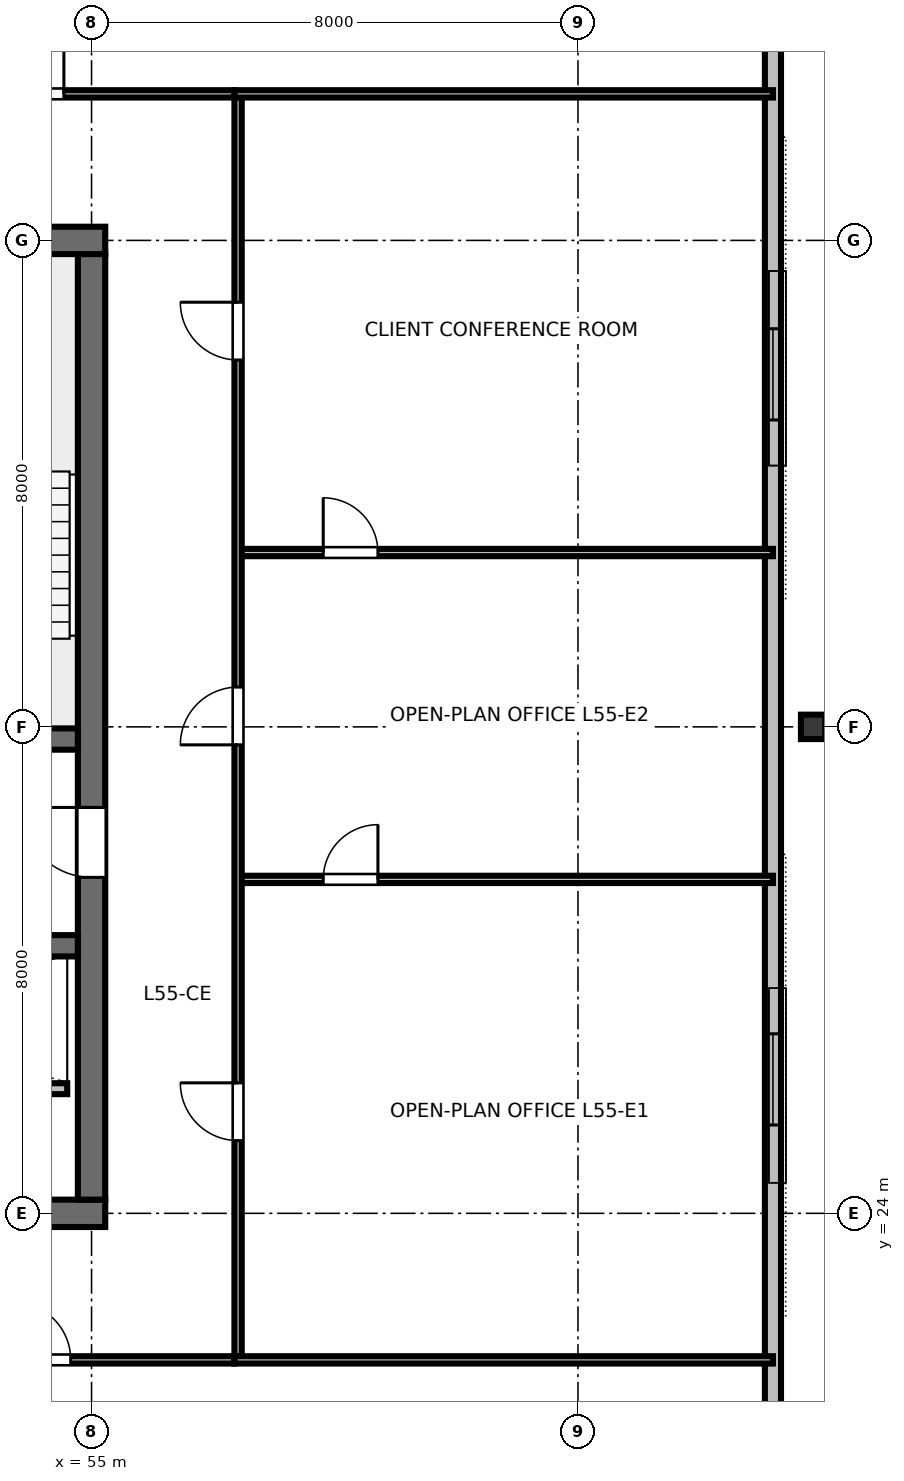
"""IFC4 building model, lengths in metres.
Left out: names, types, materials, properties, quantities, classifications, styles, units other than length and angle.
Written with IfcOpenShell. Run it as: python <this file> out.ifc"""

import sys

from ifc_helpers import new_model, si_unit, direction, frame, frame_2d, origin, origin_2d, place, context, subcontext, project, spatial, rectangle, i_section, extrude, element, fill, save


model = new_model("IFC4")
c1 = context("Model", 3, precision=1e-05, world=origin(), true_north=direction((0.0, 1.0)))
c2 = subcontext(c1, "Body", "Model", "MODEL_VIEW")
j1 = project(units=[si_unit("LENGTHUNIT", "METRE"), si_unit("PLANEANGLEUNIT", "RADIAN")], contexts=[c1])
p1 = place(None, origin())
s1 = spatial("IfcSite", under=j1, at=p1, CompositionType="ELEMENT")
p2 = place(p1, origin())
s2 = spatial("IfcBuilding", under=s1, at=p2, CompositionType="ELEMENT")
p3 = place(p2, frame((0.0, 0.0, 209.4)))
s3 = spatial("IfcBuildingStorey", under=s2, at=p3, CompositionType="ELEMENT", Elevation=209.4)
p4 = place(p3, frame((36.775, 24.0, 0.0), z_axis=(0.0, 0.0, 1.0), x_axis=(1.0, 0.0, 0.0)))
e1 = element("IfcWall", 1, at=p4, inside=s3, PredefinedType="SHEAR", context=c2, shape_type="SweptSolid", body=[
    extrude(rectangle(XDim=18.45, YDim=0.45, at=frame_2d((9.225, 0.0))), origin(), (0.0, 0.0, 1.0), 3.36),
])
p5 = place(p4, frame((13.425, 0.0, 0.0)))
e2 = element("IfcOpeningElement", 2, at=p5, cuts=e1, PredefinedType="OPENING", context=c2, shape_type="SweptSolid", body=[
    extrude(rectangle(XDim=1.6, YDim=2.15, at=frame_2d((0.8, 1.075))), frame((0.0, 0.235, 0.0), z_axis=(0.0, -1.0, 0.0), x_axis=(1.0, 0.0, 0.0)), (0.0, 0.0, 1.0), 0.47),
])
p6 = place(p3, frame((36.775, 40.0, 0.0), z_axis=(0.0, 0.0, 1.0), x_axis=(1.0, 0.0, 0.0)))
e3 = element("IfcWall", 3, at=p6, inside=s3, PredefinedType="SHEAR", context=c2, shape_type="SweptSolid", body=[
    extrude(rectangle(XDim=18.45, YDim=0.45, at=frame_2d((9.225, 0.0))), origin(), (0.0, 0.0, 1.0), 3.36),
])
p7 = place(p6, frame((8.725, 0.0, 0.0)))
e4 = element("IfcOpeningElement", 4, at=p7, cuts=e3, PredefinedType="OPENING", context=c2, shape_type="SweptSolid", body=[
    extrude(rectangle(XDim=1.0, YDim=2.15, at=frame_2d((0.5, 1.075))), frame((0.0, 0.235, 0.0), z_axis=(0.0, -1.0, 0.0), x_axis=(1.0, 0.0, 0.0)), (0.0, 0.0, 1.0), 0.47),
])
p8 = place(p3, frame((55.0, 24.225, 0.0), z_axis=(0.0, 0.0, 1.0), x_axis=(0.0, 1.0, 0.0)))
e5 = element("IfcWall", 5, at=p8, inside=s3, PredefinedType="SHEAR", context=c2, shape_type="SweptSolid", body=[
    extrude(rectangle(XDim=15.55, YDim=0.45, at=frame_2d((7.775, 0.0))), origin(), (0.0, 0.0, 1.0), 3.36),
])
p9 = place(p8, frame((5.3, 0.0, 0.0)))
e6 = element("IfcOpeningElement", 6, at=p9, cuts=e5, PredefinedType="OPENING", context=c2, shape_type="SweptSolid", body=[
    extrude(rectangle(XDim=1.15, YDim=2.15, at=frame_2d((0.575, 1.075))), frame((0.0, 0.235, 0.0), z_axis=(0.0, -1.0, 0.0), x_axis=(1.0, 0.0, 0.0)), (0.0, 0.0, 1.0), 0.47),
])
p10 = place(p3, frame((37.225, 31.8, 0.0), z_axis=(0.0, 0.0, 1.0), x_axis=(1.0, 0.0, 0.0)))
e7 = element("IfcWall", 7, at=p10, inside=s3, PredefinedType="SHEAR", context=c2, shape_type="SweptSolid", body=[
    extrude(rectangle(XDim=17.55, YDim=0.35, at=frame_2d((8.775, 0.0))), origin(), (0.0, 0.0, 1.0), 3.36),
])
p11 = place(p10, frame((0.825, 0.0, 0.0)))
e8 = element("IfcOpeningElement", 8, at=p11, cuts=e7, PredefinedType="OPENING", context=c2, shape_type="SweptSolid", body=[
    extrude(rectangle(XDim=1.1, YDim=2.15, at=frame_2d((0.55, 1.075))), frame((0.0, 0.185, 0.0), z_axis=(0.0, -1.0, 0.0), x_axis=(1.0, 0.0, 0.0)), (0.0, 0.0, 1.0), 0.37),
])
p12 = place(p10, frame((14.725, 0.0, 0.0)))
e9 = element("IfcOpeningElement", 9, at=p12, cuts=e7, PredefinedType="OPENING", context=c2, shape_type="SweptSolid", body=[
    extrude(rectangle(XDim=1.1, YDim=2.15, at=frame_2d((0.55, 1.075))), frame((0.0, 0.185, 0.0), z_axis=(0.0, -1.0, 0.0), x_axis=(1.0, 0.0, 0.0)), (0.0, 0.0, 1.0), 0.37),
])
p13 = place(p3, frame((37.225, 28.4, 0.0), z_axis=(0.0, 0.0, 1.0), x_axis=(1.0, 0.0, 0.0)))
e10 = element("IfcWall", 10, at=p13, inside=s3, PredefinedType="SHEAR", context=c2, shape_type="SweptSolid", body=[
    extrude(rectangle(XDim=17.55, YDim=0.35, at=frame_2d((8.775, 0.0))), origin(), (0.0, 0.0, 1.0), 3.36),
])
p14 = place(p3, frame((66.866, 32.0, 0.0), z_axis=(0.0, 0.0, 1.0), x_axis=(0.0, 1.0, 0.0)))
e11 = element("IfcColumn", 11, at=p14, inside=s3, PredefinedType="COLUMN", context=c2, shape_type="SweptSolid", body=[
    extrude(i_section(OverallWidth=0.401, OverallDepth=0.399, WebThickness=0.025, FlangeThickness=0.04, FilletRadius=0.025, at=origin_2d()), origin(), (0.0, 0.0, 1.0), 3.373),
])
p15 = place(p3, frame((66.206, 19.305, 0.0), z_axis=(0.0, 0.0, 1.0), x_axis=(0.0, 1.0, 0.0)))
e12 = element("IfcWall", 12, at=p15, inside=s3, PredefinedType="STANDARD", context=c2, shape_type="SweptSolid", body=[
    extrude(rectangle(XDim=25.389, YDim=0.265, at=frame_2d((12.695, 0.0))), origin(), (0.0, 0.0, 1.0), 3.375),
])
p16 = place(p15, frame((6.147, 0.0, 0.85)))
e13 = element("IfcOpeningElement", 13, at=p16, cuts=e12, PredefinedType="OPENING", context=c2, shape_type="SweptSolid", body=[
    extrude(rectangle(XDim=1.5, YDim=1.85, at=frame_2d((0.75, 0.925))), frame((0.0, 0.142, 0.0), z_axis=(0.0, -1.0, 0.0), x_axis=(1.0, 0.0, 0.0)), (0.0, 0.0, 1.0), 0.285),
])
p17 = place(p15, frame((17.742, 0.0, 0.85)))
e14 = element("IfcOpeningElement", 14, at=p17, cuts=e12, PredefinedType="OPENING", context=c2, shape_type="SweptSolid", body=[
    extrude(rectangle(XDim=1.5, YDim=1.85, at=frame_2d((0.75, 0.925))), frame((0.0, 0.142, 0.0), z_axis=(0.0, -1.0, 0.0), x_axis=(1.0, 0.0, 0.0)), (0.0, 0.0, 1.0), 0.285),
])
p18 = place(p3, frame((47.6, 26.05, 0.0), z_axis=(0.0, 0.0, 1.0), x_axis=(1.0, 0.0, 0.0)))
e15 = element("IfcWall", 15, at=p18, inside=s3, PredefinedType="PARTITIONING", context=c2, shape_type="SweptSolid", body=[
    extrude(rectangle(XDim=7.0, YDim=0.18, at=frame_2d((3.5, 0.0))), origin(), (0.0, 0.0, 1.0), 3.375),
])
p19 = place(p18, frame((1.2, 0.0, 0.0)))
e16 = element("IfcOpeningElement", 16, at=p19, cuts=e15, PredefinedType="OPENING", context=c2, shape_type="SweptSolid", body=[
    extrude(rectangle(XDim=1.05, YDim=2.15, at=frame_2d((0.525, 1.075))), frame((0.0, 0.1, 0.0), z_axis=(0.0, -1.0, 0.0), x_axis=(1.0, 0.0, 0.0)), (0.0, 0.0, 1.0), 0.2),
])
p20 = place(p18, frame((3.4, 0.0, 0.0)))
e17 = element("IfcOpeningElement", 17, at=p20, cuts=e15, PredefinedType="OPENING", context=c2, shape_type="SweptSolid", body=[
    extrude(rectangle(XDim=1.05, YDim=2.15, at=frame_2d((0.525, 1.075))), frame((0.0, 0.1, 0.0), z_axis=(0.0, -1.0, 0.0), x_axis=(1.0, 0.0, 0.0)), (0.0, 0.0, 1.0), 0.2),
])
p21 = place(p3, frame((47.02, 21.59, 0.0), z_axis=(0.0, 0.0, 1.0), x_axis=(1.0, 0.0, 0.0)))
e18 = element("IfcWall", 18, at=p21, inside=s3, PredefinedType="PARTITIONING", context=c2, shape_type="SweptSolid", body=[
    extrude(rectangle(XDim=10.33, YDim=0.12, at=frame_2d((5.165, 0.0))), origin(), (0.0, 0.0, 1.0), 2.655),
])
p22 = place(p21, frame((1.593, 0.0, 0.0)))
e19 = element("IfcOpeningElement", 19, at=p22, cuts=e18, PredefinedType="OPENING", context=c2, shape_type="SweptSolid", body=[
    extrude(rectangle(XDim=0.95, YDim=2.15, at=frame_2d((0.475, 1.075))), frame((0.0, 0.07, 0.0), z_axis=(0.0, -1.0, 0.0), x_axis=(1.0, 0.0, 0.0)), (0.0, 0.0, 1.0), 0.14),
])
p23 = place(p21, frame((6.688, 0.0, 0.0)))
e20 = element("IfcOpeningElement", 20, at=p23, cuts=e18, PredefinedType="OPENING", context=c2, shape_type="SweptSolid", body=[
    extrude(rectangle(XDim=0.95, YDim=2.15, at=frame_2d((0.475, 1.075))), frame((0.0, 0.07, 0.0), z_axis=(0.0, -1.0, 0.0), x_axis=(1.0, 0.0, 0.0)), (0.0, 0.0, 1.0), 0.14),
])
p24 = place(p3, frame((47.02, 42.41, 0.0), z_axis=(0.0, 0.0, 1.0), x_axis=(1.0, 0.0, 0.0)))
e21 = element("IfcWall", 21, at=p24, inside=s3, PredefinedType="PARTITIONING", context=c2, shape_type="SweptSolid", body=[
    extrude(rectangle(XDim=10.33, YDim=0.12, at=frame_2d((5.165, 0.0))), origin(), (0.0, 0.0, 1.0), 2.655),
])
p25 = place(p24, frame((1.48, 0.0, 0.0)))
e22 = element("IfcOpeningElement", 22, at=p25, cuts=e21, PredefinedType="OPENING", context=c2, shape_type="SweptSolid", body=[
    extrude(rectangle(XDim=0.95, YDim=2.15, at=frame_2d((0.475, 1.075))), frame((0.0, 0.07, 0.0), z_axis=(0.0, -1.0, 0.0), x_axis=(1.0, 0.0, 0.0)), (0.0, 0.0, 1.0), 0.14),
])
p26 = place(p24, frame((6.575, 0.0, 0.0)))
e23 = element("IfcOpeningElement", 23, at=p26, cuts=e21, PredefinedType="OPENING", context=c2, shape_type="SweptSolid", body=[
    extrude(rectangle(XDim=0.95, YDim=2.15, at=frame_2d((0.475, 1.075))), frame((0.0, 0.07, 0.0), z_axis=(0.0, -1.0, 0.0), x_axis=(1.0, 0.0, 0.0)), (0.0, 0.0, 1.0), 0.14),
])
p27 = place(p3, frame((57.41, 29.492, 0.0), z_axis=(0.0, 0.0, 1.0), x_axis=(1.0, 0.0, 0.0)))
e24 = element("IfcWall", 24, at=p27, inside=s3, PredefinedType="PARTITIONING", context=c2, shape_type="SweptSolid", body=[
    extrude(rectangle(XDim=8.796, YDim=0.12, at=frame_2d((4.398, 0.0))), origin(), (0.0, 0.0, 1.0), 2.655),
])
p28 = place(p27, frame((1.4, 0.0, 0.0)))
e25 = element("IfcOpeningElement", 25, at=p28, cuts=e24, PredefinedType="OPENING", context=c2, shape_type="SweptSolid", body=[
    extrude(rectangle(XDim=0.9, YDim=2.15, at=frame_2d((0.45, 1.075))), frame((0.0, 0.07, 0.0), z_axis=(0.0, -1.0, 0.0), x_axis=(1.0, 0.0, 0.0)), (0.0, 0.0, 1.0), 0.14),
])
p29 = place(p3, frame((57.41, 34.867, 0.0), z_axis=(0.0, 0.0, 1.0), x_axis=(1.0, 0.0, 0.0)))
e26 = element("IfcWall", 26, at=p29, inside=s3, PredefinedType="PARTITIONING", context=c2, shape_type="SweptSolid", body=[
    extrude(rectangle(XDim=8.796, YDim=0.12, at=frame_2d((4.398, 0.0))), origin(), (0.0, 0.0, 1.0), 2.655),
])
p30 = place(p29, frame((1.4, 0.0, 0.0)))
e27 = element("IfcOpeningElement", 27, at=p30, cuts=e26, PredefinedType="OPENING", context=c2, shape_type="SweptSolid", body=[
    extrude(rectangle(XDim=0.9, YDim=2.15, at=frame_2d((0.45, 1.075))), frame((0.0, 0.07, 0.0), z_axis=(0.0, -1.0, 0.0), x_axis=(1.0, 0.0, 0.0)), (0.0, 0.0, 1.0), 0.14),
])
p31 = place(p3, frame((57.41, 21.65, 0.0), z_axis=(0.0, 0.0, 1.0), x_axis=(0.0, 1.0, 0.0)))
e28 = element("IfcWall", 28, at=p31, inside=s3, PredefinedType="PARTITIONING", context=c2, shape_type="SweptSolid", body=[
    extrude(rectangle(XDim=20.7, YDim=0.12, at=frame_2d((10.35, 0.0))), origin(), (0.0, 0.0, 1.0), 2.655),
])
p32 = place(p31, frame((3.546, 0.0, 0.0)))
e29 = element("IfcOpeningElement", 29, at=p32, cuts=e28, PredefinedType="OPENING", context=c2, shape_type="SweptSolid", body=[
    extrude(rectangle(XDim=0.95, YDim=2.15, at=frame_2d((0.475, 1.075))), frame((0.0, 0.07, 0.0), z_axis=(0.0, -1.0, 0.0), x_axis=(1.0, 0.0, 0.0)), (0.0, 0.0, 1.0), 0.14),
])
p33 = place(p31, frame((10.054, 0.0, 0.0)))
e30 = element("IfcOpeningElement", 30, at=p33, cuts=e28, PredefinedType="OPENING", context=c2, shape_type="SweptSolid", body=[
    extrude(rectangle(XDim=0.95, YDim=2.15, at=frame_2d((0.475, 1.075))), frame((0.0, 0.07, 0.0), z_axis=(0.0, -1.0, 0.0), x_axis=(1.0, 0.0, 0.0)), (0.0, 0.0, 1.0), 0.14),
])
p34 = place(p31, frame((16.384, 0.0, 0.0)))
e31 = element("IfcOpeningElement", 31, at=p34, cuts=e28, PredefinedType="OPENING", context=c2, shape_type="SweptSolid", body=[
    extrude(rectangle(XDim=0.95, YDim=2.15, at=frame_2d((0.475, 1.075))), frame((0.0, 0.07, 0.0), z_axis=(0.0, -1.0, 0.0), x_axis=(1.0, 0.0, 0.0)), (0.0, 0.0, 1.0), 0.14),
])
for number, where, z_axis, x_axis in (
    (32, (57.35, 21.59, 0.0), (0.0, 0.0, 1.0), (1.0, 0.0, 0.0)),
    (33, (57.35, 42.41, 0.0), (0.0, 0.0, 1.0), (1.0, 0.0, 0.0)),
):
    element("IfcWall", number, at=place(p3, frame(where, z_axis=z_axis, x_axis=x_axis)), inside=s3, PredefinedType="PARTITIONING", context=c2, shape_type="SweptSolid", body=[
        extrude(rectangle(XDim=8.856, YDim=0.12, at=frame_2d((4.428, 0.0))), origin(), (0.0, 0.0, 1.0), 2.655),
    ])
p35 = place(p16, origin())
e34 = element("IfcWindow", 34, at=p35, inside=s3, PartitioningType="SINGLE_PANEL", PredefinedType="WINDOW", context=c2, shape_type="SweptSolid", body=[
    extrude(rectangle(XDim=1.5, YDim=1.85, at=frame_2d((0.75, 0.925))), frame((0.0, 0.03, 0.0), z_axis=(0.0, -1.0, 0.0), x_axis=(1.0, 0.0, 0.0)), (0.0, 0.0, 1.0), 0.06),
])
fill(e13, e34)
p36 = place(p17, origin())
e35 = element("IfcWindow", 35, at=p36, inside=s3, PartitioningType="SINGLE_PANEL", PredefinedType="WINDOW", context=c2, shape_type="SweptSolid", body=[
    extrude(rectangle(XDim=1.5, YDim=1.85, at=frame_2d((0.75, 0.925))), frame((0.0, 0.03, 0.0), z_axis=(0.0, -1.0, 0.0), x_axis=(1.0, 0.0, 0.0)), (0.0, 0.0, 1.0), 0.06),
])
fill(e14, e35)
p37 = place(p9, origin())
e36 = element("IfcDoor", 36, at=p37, inside=s3, OperationType="SINGLE_SWING_RIGHT", PredefinedType="DOOR", context=c2, shape_type="SweptSolid", body=[
    extrude(rectangle(XDim=1.15, YDim=2.15, at=frame_2d((0.575, 1.075))), frame((0.0, 0.025, 0.0), z_axis=(0.0, -1.0, 0.0), x_axis=(1.0, 0.0, 0.0)), (0.0, 0.0, 1.0), 0.05),
])
fill(e6, e36)
p38 = place(p23, origin())
e37 = element("IfcDoor", 37, at=p38, inside=s3, OperationType="SINGLE_SWING_LEFT", PredefinedType="DOOR", context=c2, shape_type="SweptSolid", body=[
    extrude(rectangle(XDim=0.95, YDim=2.15, at=frame_2d((0.475, 1.075))), frame((0.0, 0.025, 0.0), z_axis=(0.0, -1.0, 0.0), x_axis=(1.0, 0.0, 0.0)), (0.0, 0.0, 1.0), 0.05),
])
fill(e20, e37)
p39 = place(p26, origin())
e38 = element("IfcDoor", 38, at=p39, inside=s3, OperationType="SINGLE_SWING_RIGHT", PredefinedType="DOOR", context=c2, shape_type="SweptSolid", body=[
    extrude(rectangle(XDim=0.95, YDim=2.15, at=frame_2d((0.475, 1.075))), frame((0.0, 0.025, 0.0), z_axis=(0.0, -1.0, 0.0), x_axis=(1.0, 0.0, 0.0)), (0.0, 0.0, 1.0), 0.05),
])
fill(e23, e38)
p40 = place(p28, origin())
e39 = element("IfcDoor", 39, at=p40, inside=s3, OperationType="SINGLE_SWING_RIGHT", PredefinedType="DOOR", context=c2, shape_type="SweptSolid", body=[
    extrude(rectangle(XDim=0.9, YDim=2.15, at=frame_2d((0.45, 1.075))), frame((0.0, 0.025, 0.0), z_axis=(0.0, -1.0, 0.0), x_axis=(1.0, 0.0, 0.0)), (0.0, 0.0, 1.0), 0.05),
])
fill(e25, e39)
p41 = place(p30, origin())
e40 = element("IfcDoor", 40, at=p41, inside=s3, OperationType="SINGLE_SWING_LEFT", PredefinedType="DOOR", context=c2, shape_type="SweptSolid", body=[
    extrude(rectangle(XDim=0.9, YDim=2.15, at=frame_2d((0.45, 1.075))), frame((0.0, 0.025, 0.0), z_axis=(0.0, -1.0, 0.0), x_axis=(1.0, 0.0, 0.0)), (0.0, 0.0, 1.0), 0.05),
])
fill(e27, e40)
p42 = place(p32, origin())
e41 = element("IfcDoor", 41, at=p42, inside=s3, OperationType="SINGLE_SWING_RIGHT", PredefinedType="DOOR", context=c2, shape_type="SweptSolid", body=[
    extrude(rectangle(XDim=0.95, YDim=2.15, at=frame_2d((0.475, 1.075))), frame((0.0, 0.025, 0.0), z_axis=(0.0, -1.0, 0.0), x_axis=(1.0, 0.0, 0.0)), (0.0, 0.0, 1.0), 0.05),
])
fill(e29, e41)
p43 = place(p33, origin())
e42 = element("IfcDoor", 42, at=p43, inside=s3, OperationType="SINGLE_SWING_LEFT", PredefinedType="DOOR", context=c2, shape_type="SweptSolid", body=[
    extrude(rectangle(XDim=0.95, YDim=2.15, at=frame_2d((0.475, 1.075))), frame((0.0, 0.025, 0.0), z_axis=(0.0, -1.0, 0.0), x_axis=(1.0, 0.0, 0.0)), (0.0, 0.0, 1.0), 0.05),
])
fill(e30, e42)
p44 = place(p34, origin())
e43 = element("IfcDoor", 43, at=p44, inside=s3, OperationType="SINGLE_SWING_RIGHT", PredefinedType="DOOR", context=c2, shape_type="SweptSolid", body=[
    extrude(rectangle(XDim=0.95, YDim=2.15, at=frame_2d((0.475, 1.075))), frame((0.0, 0.025, 0.0), z_axis=(0.0, -1.0, 0.0), x_axis=(1.0, 0.0, 0.0)), (0.0, 0.0, 1.0), 0.05),
])
fill(e31, e43)
save(model, sys.argv[1])
